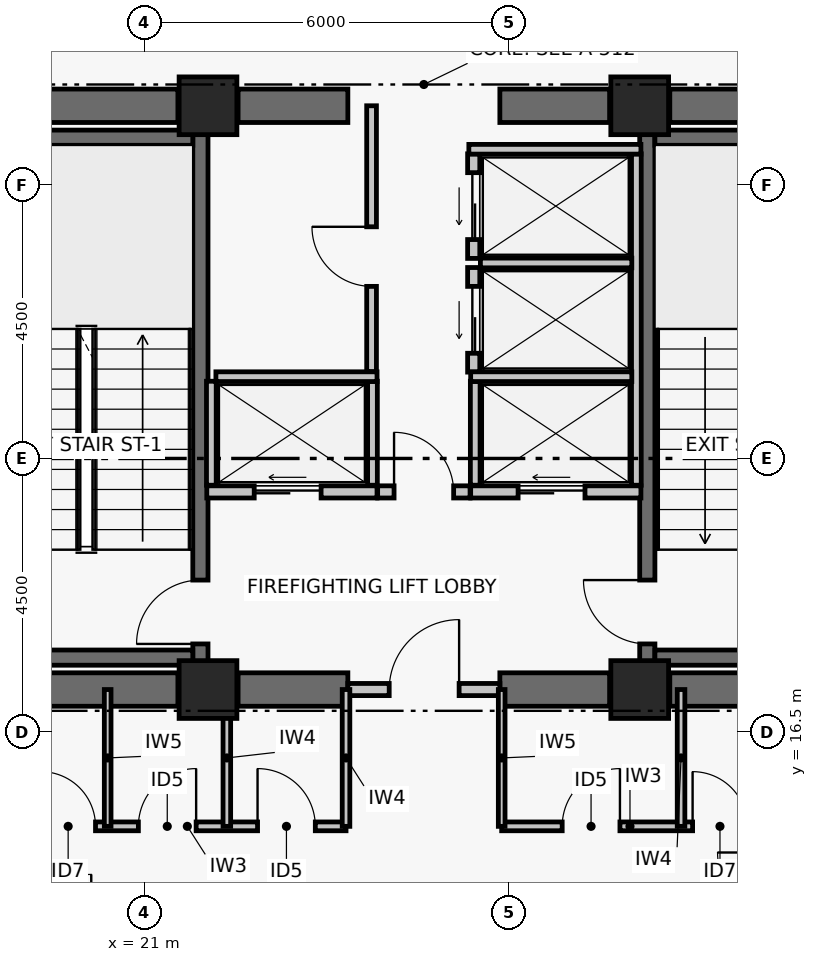
"""IFC4 building model, lengths in metres.
Left out: names, types, materials, properties, quantities, classifications, styles, units other than length and angle.
Written with IfcOpenShell. Run it as: python <this file> out.ifc"""

import sys

from ifc_helpers import new_model, si_unit, direction, frame, frame_2d, origin, origin_2d, place, context, subcontext, project, spatial, rectangle, extrude, element, fill, save


model = new_model("IFC4")
c1 = context("Model", 3, precision=1e-05, world=origin(), true_north=direction((0.0, 1.0)))
c2 = subcontext(c1, "Body", "Model", "MODEL_VIEW")
j1 = project(units=[si_unit("LENGTHUNIT", "METRE"), si_unit("PLANEANGLEUNIT", "RADIAN")], contexts=[c1])
p1 = place(None, origin())
s1 = spatial("IfcSite", under=j1, at=p1, CompositionType="ELEMENT")
p2 = place(p1, origin())
s2 = spatial("IfcBuilding", under=s1, at=p2, CompositionType="ELEMENT")
p3 = place(p2, frame((0.0, 0.0, 154.32)))
s3 = spatial("IfcBuildingStorey", under=s2, at=p3, CompositionType="ELEMENT", Elevation=154.32)
for number, where, z_axis, x_axis in (
    (1, (22.05, 17.2, 0.0), (0.0, 0.0, 1.0), (1.0, 0.0, 0.0)),
    (2, (29.15, 17.2, 0.0), (0.0, 0.0, 1.0), (1.0, 0.0, 0.0)),
    (3, (22.05, 26.8, 0.0), (0.0, 0.0, 1.0), (1.0, 0.0, 0.0)),
    (4, (29.15, 26.8, 0.0), (0.0, 0.0, 1.0), (1.0, 0.0, 0.0)),
):
    element("IfcColumn", number, at=place(p3, frame(where, z_axis=z_axis, x_axis=x_axis)), inside=s3, PredefinedType="COLUMN", context=c2, shape_type="SweptSolid", body=[
        extrude(rectangle(XDim=0.95, YDim=0.95, at=origin_2d()), origin(), (0.0, 0.0, 1.0), 3.72),
    ])
p4 = place(p3, frame((18.295, 17.2, 0.0), z_axis=(0.0, 0.0, 1.0), x_axis=(1.0, 0.0, 0.0)))
e5 = element("IfcWall", 5, at=p4, inside=s3, PredefinedType="SHEAR", context=c2, shape_type="SweptSolid", body=[
    extrude(rectangle(XDim=3.26, YDim=0.55, at=frame_2d((1.63, 0.0))), origin(), (0.0, 0.0, 1.0), 3.5),
])
p5 = place(p3, frame((22.545, 17.2, 0.0), z_axis=(0.0, 0.0, 1.0), x_axis=(1.0, 0.0, 0.0)))
e6 = element("IfcWall", 6, at=p5, inside=s3, PredefinedType="SHEAR", context=c2, shape_type="SweptSolid", body=[
    extrude(rectangle(XDim=1.805, YDim=0.55, at=frame_2d((0.903, 0.0))), origin(), (0.0, 0.0, 1.0), 3.5),
])
p6 = place(p3, frame((26.85, 17.2, 0.0), z_axis=(0.0, 0.0, 1.0), x_axis=(1.0, 0.0, 0.0)))
e7 = element("IfcWall", 7, at=p6, inside=s3, PredefinedType="SHEAR", context=c2, shape_type="SweptSolid", body=[
    extrude(rectangle(XDim=1.805, YDim=0.55, at=frame_2d((0.902, 0.0))), origin(), (0.0, 0.0, 1.0), 3.5),
])
for number, where, z_axis, x_axis in (
    (8, (29.645, 17.2, 0.0), (0.0, 0.0, 1.0), (1.0, 0.0, 0.0)),
    (9, (18.295, 26.8, 0.0), (0.0, 0.0, 1.0), (1.0, 0.0, 0.0)),
):
    element("IfcWall", number, at=place(p3, frame(where, z_axis=z_axis, x_axis=x_axis)), inside=s3, PredefinedType="SHEAR", context=c2, shape_type="SweptSolid", body=[
        extrude(rectangle(XDim=3.26, YDim=0.55, at=frame_2d((1.63, 0.0))), origin(), (0.0, 0.0, 1.0), 3.5),
    ])
p7 = place(p3, frame((22.545, 26.8, 0.0), z_axis=(0.0, 0.0, 1.0), x_axis=(1.0, 0.0, 0.0)))
e10 = element("IfcWall", 10, at=p7, inside=s3, PredefinedType="SHEAR", context=c2, shape_type="SweptSolid", body=[
    extrude(rectangle(XDim=1.805, YDim=0.55, at=frame_2d((0.903, 0.0))), origin(), (0.0, 0.0, 1.0), 3.5),
])
p8 = place(p3, frame((26.85, 26.8, 0.0), z_axis=(0.0, 0.0, 1.0), x_axis=(1.0, 0.0, 0.0)))
e11 = element("IfcWall", 11, at=p8, inside=s3, PredefinedType="SHEAR", context=c2, shape_type="SweptSolid", body=[
    extrude(rectangle(XDim=1.805, YDim=0.55, at=frame_2d((0.902, 0.0))), origin(), (0.0, 0.0, 1.0), 3.5),
])
p9 = place(p3, frame((29.645, 26.8, 0.0), z_axis=(0.0, 0.0, 1.0), x_axis=(1.0, 0.0, 0.0)))
e12 = element("IfcWall", 12, at=p9, inside=s3, PredefinedType="SHEAR", context=c2, shape_type="SweptSolid", body=[
    extrude(rectangle(XDim=3.26, YDim=0.55, at=frame_2d((1.63, 0.0))), origin(), (0.0, 0.0, 1.0), 3.5),
])
p10 = place(p3, frame((21.925, 17.6, 0.0), z_axis=(0.0, 0.0, 1.0), x_axis=(0.0, 1.0, 0.0)))
e13 = element("IfcWall", 13, at=p10, inside=s3, PredefinedType="SHEAR", context=c2, shape_type="SweptSolid", body=[
    extrude(rectangle(XDim=8.8, YDim=0.25, at=frame_2d((4.4, 0.0))), origin(), (0.0, 0.0, 1.0), 3.5),
])
p11 = place(p10, frame((0.35, 0.0, 0.0)))
e14 = element("IfcOpeningElement", 14, at=p11, cuts=e13, PredefinedType="OPENING", context=c2, shape_type="SweptSolid", body=[
    extrude(rectangle(XDim=1.05, YDim=2.08, at=frame_2d((0.525, 1.04))), frame((0.0, 0.135, 0.0), z_axis=(0.0, -1.0, 0.0), x_axis=(1.0, 0.0, 0.0)), (0.0, 0.0, 1.0), 0.27),
])
for number, where, z_axis, x_axis in (
    (15, (18.329, 17.725, 0.0), (0.0, 0.0, 1.0), (1.0, 0.0, 0.0)),
    (16, (18.329, 26.275, 0.0), (0.0, 0.0, 1.0), (1.0, 0.0, 0.0)),
):
    element("IfcWall", number, at=place(p3, frame(where, z_axis=z_axis, x_axis=x_axis)), inside=s3, PredefinedType="SHEAR", context=c2, shape_type="SweptSolid", body=[
        extrude(rectangle(XDim=3.471, YDim=0.25, at=frame_2d((1.735, 0.0))), origin(), (0.0, 0.0, 1.0), 3.5),
    ])
p12 = place(p3, frame((29.275, 17.6, 0.0), z_axis=(0.0, 0.0, 1.0), x_axis=(0.0, 1.0, 0.0)))
e17 = element("IfcWall", 17, at=p12, inside=s3, PredefinedType="SHEAR", context=c2, shape_type="SweptSolid", body=[
    extrude(rectangle(XDim=8.8, YDim=0.25, at=frame_2d((4.4, 0.0))), origin(), (0.0, 0.0, 1.0), 3.5),
])
p13 = place(p12, frame((0.35, 0.0, 0.0)))
e18 = element("IfcOpeningElement", 18, at=p13, cuts=e17, PredefinedType="OPENING", context=c2, shape_type="SweptSolid", body=[
    extrude(rectangle(XDim=1.05, YDim=2.08, at=frame_2d((0.525, 1.04))), frame((0.0, 0.135, 0.0), z_axis=(0.0, -1.0, 0.0), x_axis=(1.0, 0.0, 0.0)), (0.0, 0.0, 1.0), 0.27),
])
for number, where, z_axis, x_axis in (
    (19, (29.4, 17.725, 0.0), (0.0, 0.0, 1.0), (1.0, 0.0, 0.0)),
    (20, (29.4, 26.275, 0.0), (0.0, 0.0, 1.0), (1.0, 0.0, 0.0)),
):
    element("IfcWall", number, at=place(p3, frame(where, z_axis=z_axis, x_axis=x_axis)), inside=s3, PredefinedType="SHEAR", context=c2, shape_type="SweptSolid", body=[
        extrude(rectangle(XDim=3.471, YDim=0.25, at=frame_2d((1.736, 0.0))), origin(), (0.0, 0.0, 1.0), 3.5),
    ])
p14 = place(p3, frame((24.35, 17.2, 0.0), z_axis=(0.0, 0.0, 1.0), x_axis=(1.0, 0.0, 0.0)))
e21 = element("IfcWall", 21, at=p14, inside=s3, PredefinedType="PARTITIONING", context=c2, shape_type="SweptSolid", body=[
    extrude(rectangle(XDim=2.5, YDim=0.2, at=frame_2d((1.25, 0.0))), origin(), (0.0, 0.0, 1.0), 2.63),
])
p15 = place(p14, frame((0.68, 0.0, 0.0)))
e22 = element("IfcOpeningElement", 22, at=p15, cuts=e21, PredefinedType="OPENING", context=c2, shape_type="SweptSolid", body=[
    extrude(rectangle(XDim=1.15, YDim=2.08, at=frame_2d((0.575, 1.04))), frame((0.0, 0.11, 0.0), z_axis=(0.0, -1.0, 0.0), x_axis=(1.0, 0.0, 0.0)), (0.0, 0.0, 1.0), 0.22),
])
p16 = place(p3, frame((24.84, 20.45, 0.0), z_axis=(0.0, 0.0, 1.0), x_axis=(1.0, 0.0, 0.0)))
e23 = element("IfcWall", 23, at=p16, inside=s3, PredefinedType="PARTITIONING", context=c2, shape_type="SweptSolid", body=[
    extrude(rectangle(XDim=1.52, YDim=0.2, at=frame_2d((0.76, 0.0))), origin(), (0.0, 0.0, 1.0), 3.5),
])
p17 = place(p16, frame((0.27, 0.0, 0.0)))
e24 = element("IfcOpeningElement", 24, at=p17, cuts=e23, PredefinedType="OPENING", context=c2, shape_type="SweptSolid", body=[
    extrude(rectangle(XDim=0.98, YDim=2.06, at=frame_2d((0.49, 1.03))), frame((0.0, 0.11, 0.0), z_axis=(0.0, -1.0, 0.0), x_axis=(1.0, 0.0, 0.0)), (0.0, 0.0, 1.0), 0.22),
])
p18 = place(p3, frame((22.03, 20.45, 0.0), z_axis=(0.0, 0.0, 1.0), x_axis=(1.0, 0.0, 0.0)))
e25 = element("IfcWall", 25, at=p18, inside=s3, PredefinedType="PARTITIONING", context=c2, shape_type="SweptSolid", body=[
    extrude(rectangle(XDim=2.8, YDim=0.2, at=frame_2d((1.4, 0.0))), origin(), (0.0, 0.0, 1.0), 3.5),
])
p19 = place(p18, frame((0.78, 0.0, 0.0)))
e26 = element("IfcOpeningElement", 26, at=p19, cuts=e25, PredefinedType="OPENING", context=c2, shape_type="SweptSolid", body=[
    extrude(rectangle(XDim=1.1, YDim=2.08, at=frame_2d((0.55, 1.04))), frame((0.0, 0.11, 0.0), z_axis=(0.0, -1.0, 0.0), x_axis=(1.0, 0.0, 0.0)), (0.0, 0.0, 1.0), 0.22),
])
p20 = place(p3, frame((26.37, 20.45, 0.0), z_axis=(0.0, 0.0, 1.0), x_axis=(1.0, 0.0, 0.0)))
e27 = element("IfcWall", 27, at=p20, inside=s3, PredefinedType="PARTITIONING", context=c2, shape_type="SweptSolid", body=[
    extrude(rectangle(XDim=2.8, YDim=0.2, at=frame_2d((1.4, 0.0))), origin(), (0.0, 0.0, 1.0), 3.5),
])
p21 = place(p20, frame((0.78, 0.0, 0.0)))
e28 = element("IfcOpeningElement", 28, at=p21, cuts=e27, PredefinedType="OPENING", context=c2, shape_type="SweptSolid", body=[
    extrude(rectangle(XDim=1.1, YDim=2.08, at=frame_2d((0.55, 1.04))), frame((0.0, 0.11, 0.0), z_axis=(0.0, -1.0, 0.0), x_axis=(1.0, 0.0, 0.0)), (0.0, 0.0, 1.0), 0.22),
])
p22 = place(p3, frame((26.42, 22.42, 0.0), z_axis=(0.0, 0.0, 1.0), x_axis=(0.0, 1.0, 0.0)))
e29 = element("IfcWall", 29, at=p22, inside=s3, PredefinedType="PARTITIONING", context=c2, shape_type="SweptSolid", body=[
    extrude(rectangle(XDim=1.72, YDim=0.2, at=frame_2d((0.86, 0.0))), origin(), (0.0, 0.0, 1.0), 3.5),
])
p23 = place(p22, frame((0.31, 0.0, 0.0)))
e30 = element("IfcOpeningElement", 30, at=p23, cuts=e29, PredefinedType="OPENING", context=c2, shape_type="SweptSolid", body=[
    extrude(rectangle(XDim=1.1, YDim=2.08, at=frame_2d((0.55, 1.04))), frame((0.0, 0.11, 0.0), z_axis=(0.0, -1.0, 0.0), x_axis=(1.0, 0.0, 0.0)), (0.0, 0.0, 1.0), 0.22),
])
p24 = place(p3, frame((26.42, 24.29, 0.0), z_axis=(0.0, 0.0, 1.0), x_axis=(0.0, 1.0, 0.0)))
e31 = element("IfcWall", 31, at=p24, inside=s3, PredefinedType="PARTITIONING", context=c2, shape_type="SweptSolid", body=[
    extrude(rectangle(XDim=1.72, YDim=0.2, at=frame_2d((0.86, 0.0))), origin(), (0.0, 0.0, 1.0), 3.5),
])
p25 = place(p24, frame((0.31, 0.0, 0.0)))
e32 = element("IfcOpeningElement", 32, at=p25, cuts=e31, PredefinedType="OPENING", context=c2, shape_type="SweptSolid", body=[
    extrude(rectangle(XDim=1.1, YDim=2.08, at=frame_2d((0.55, 1.04))), frame((0.0, 0.11, 0.0), z_axis=(0.0, -1.0, 0.0), x_axis=(1.0, 0.0, 0.0)), (0.0, 0.0, 1.0), 0.22),
])
for number, where, z_axis, x_axis in (
    (33, (22.105, 20.56, 0.0), (0.0, 0.0, 1.0), (0.0, 1.0, 0.0)),
    (34, (24.755, 20.56, 0.0), (0.0, 0.0, 1.0), (0.0, 1.0, 0.0)),
):
    element("IfcWall", number, at=place(p3, frame(where, z_axis=z_axis, x_axis=x_axis)), inside=s3, PredefinedType="PARTITIONING", context=c2, shape_type="SweptSolid", body=[
        extrude(rectangle(XDim=1.71, YDim=0.16, at=frame_2d((0.855, 0.0))), origin(), (0.0, 0.0, 1.0), 3.5),
    ])
p26 = place(p3, frame((22.18, 22.345, 0.0), z_axis=(0.0, 0.0, 1.0), x_axis=(1.0, 0.0, 0.0)))
e35 = element("IfcWall", 35, at=p26, inside=s3, PredefinedType="PARTITIONING", context=c2, shape_type="SweptSolid", body=[
    extrude(rectangle(XDim=2.65, YDim=0.16, at=frame_2d((1.325, 0.0))), origin(), (0.0, 0.0, 1.0), 3.5),
])
p27 = place(p3, frame((29.095, 20.56, 0.0), z_axis=(0.0, 0.0, 1.0), x_axis=(0.0, 1.0, 0.0)))
e36 = element("IfcWall", 36, at=p27, inside=s3, PredefinedType="PARTITIONING", context=c2, shape_type="SweptSolid", body=[
    extrude(rectangle(XDim=5.45, YDim=0.16, at=frame_2d((2.725, 0.0))), origin(), (0.0, 0.0, 1.0), 3.5),
])
p28 = place(p3, frame((26.445, 20.56, 0.0), z_axis=(0.0, 0.0, 1.0), x_axis=(0.0, 1.0, 0.0)))
e37 = element("IfcWall", 37, at=p28, inside=s3, PredefinedType="PARTITIONING", context=c2, shape_type="SweptSolid", body=[
    extrude(rectangle(XDim=1.71, YDim=0.16, at=frame_2d((0.855, 0.0))), origin(), (0.0, 0.0, 1.0), 3.5),
])
p29 = place(p3, frame((26.37, 22.345, 0.0), z_axis=(0.0, 0.0, 1.0), x_axis=(1.0, 0.0, 0.0)))
e38 = element("IfcWall", 38, at=p29, inside=s3, PredefinedType="PARTITIONING", context=c2, shape_type="SweptSolid", body=[
    extrude(rectangle(XDim=2.65, YDim=0.16, at=frame_2d((1.325, 0.0))), origin(), (0.0, 0.0, 1.0), 3.5),
])
p30 = place(p3, frame((26.53, 24.215, 0.0), z_axis=(0.0, 0.0, 1.0), x_axis=(1.0, 0.0, 0.0)))
e39 = element("IfcWall", 39, at=p30, inside=s3, PredefinedType="PARTITIONING", context=c2, shape_type="SweptSolid", body=[
    extrude(rectangle(XDim=2.49, YDim=0.16, at=frame_2d((1.245, 0.0))), origin(), (0.0, 0.0, 1.0), 3.5),
])
p31 = place(p3, frame((26.34, 26.085, 0.0), z_axis=(0.0, 0.0, 1.0), x_axis=(1.0, 0.0, 0.0)))
e40 = element("IfcWall", 40, at=p31, inside=s3, PredefinedType="PARTITIONING", context=c2, shape_type="SweptSolid", body=[
    extrude(rectangle(XDim=2.83, YDim=0.16, at=frame_2d((1.415, 0.0))), origin(), (0.0, 0.0, 1.0), 3.5),
])
p32 = place(p3, frame((24.74, 22.43, 0.0), z_axis=(0.0, 0.0, 1.0), x_axis=(0.0, 1.0, 0.0)))
e41 = element("IfcWall", 41, at=p32, inside=s3, PredefinedType="PARTITIONING", context=c2, shape_type="SweptSolid", body=[
    extrude(rectangle(XDim=4.37, YDim=0.16, at=frame_2d((2.185, 0.0))), origin(), (0.0, 0.0, 1.0), 2.63),
])
p33 = place(p32, frame((1.4, 0.0, 0.0)))
e42 = element("IfcOpeningElement", 42, at=p33, cuts=e41, PredefinedType="OPENING", context=c2, shape_type="SweptSolid", body=[
    extrude(rectangle(XDim=0.98, YDim=2.06, at=frame_2d((0.49, 1.03))), frame((0.0, 0.09, 0.0), z_axis=(0.0, -1.0, 0.0), x_axis=(1.0, 0.0, 0.0)), (0.0, 0.0, 1.0), 0.18),
])
p34 = place(p3, frame((19.1, 14.95, 0.0), z_axis=(0.0, 0.0, 1.0), x_axis=(1.0, 0.0, 0.0)))
e43 = element("IfcWall", 43, at=p34, inside=s3, PredefinedType="PARTITIONING", context=c2, shape_type="SweptSolid", body=[
    extrude(rectangle(XDim=5.22, YDim=0.145, at=frame_2d((2.61, 0.0))), origin(), (0.0, 0.0, 1.0), 2.73),
])
p35 = place(p34, frame((0.2, 0.0, 0.0)))
e44 = element("IfcOpeningElement", 44, at=p35, cuts=e43, PredefinedType="OPENING", context=c2, shape_type="SweptSolid", body=[
    extrude(rectangle(XDim=0.9, YDim=2.02, at=frame_2d((0.45, 1.01))), frame((0.0, 0.083, 0.0), z_axis=(0.0, -1.0, 0.0), x_axis=(1.0, 0.0, 0.0)), (0.0, 0.0, 1.0), 0.165),
])
p36 = place(p34, frame((1.805, 0.0, 0.0)))
e45 = element("IfcOpeningElement", 45, at=p36, cuts=e43, PredefinedType="OPENING", context=c2, shape_type="SweptSolid", body=[
    extrude(rectangle(XDim=0.95, YDim=2.06, at=frame_2d((0.475, 1.03))), frame((0.0, 0.083, 0.0), z_axis=(0.0, -1.0, 0.0), x_axis=(1.0, 0.0, 0.0)), (0.0, 0.0, 1.0), 0.165),
])
p37 = place(p34, frame((3.765, 0.0, 0.0)))
e46 = element("IfcOpeningElement", 46, at=p37, cuts=e43, PredefinedType="OPENING", context=c2, shape_type="SweptSolid", body=[
    extrude(rectangle(XDim=0.95, YDim=2.06, at=frame_2d((0.475, 1.03))), frame((0.0, 0.083, 0.0), z_axis=(0.0, -1.0, 0.0), x_axis=(1.0, 0.0, 0.0)), (0.0, 0.0, 1.0), 0.165),
])
p38 = place(p3, frame((26.88, 14.95, 0.0), z_axis=(0.0, 0.0, 1.0), x_axis=(1.0, 0.0, 0.0)))
e47 = element("IfcWall", 47, at=p38, inside=s3, PredefinedType="PARTITIONING", context=c2, shape_type="SweptSolid", body=[
    extrude(rectangle(XDim=4.22, YDim=0.145, at=frame_2d((2.11, 0.0))), origin(), (0.0, 0.0, 1.0), 2.93),
])
p39 = place(p38, frame((0.995, 0.0, 0.0)))
e48 = element("IfcOpeningElement", 48, at=p39, cuts=e47, PredefinedType="OPENING", context=c2, shape_type="SweptSolid", body=[
    extrude(rectangle(XDim=0.95, YDim=2.06, at=frame_2d((0.475, 1.03))), frame((0.0, 0.083, 0.0), z_axis=(0.0, -1.0, 0.0), x_axis=(1.0, 0.0, 0.0)), (0.0, 0.0, 1.0), 0.165),
])
p40 = place(p38, frame((3.14, 0.0, 0.0)))
e49 = element("IfcOpeningElement", 49, at=p40, cuts=e47, PredefinedType="OPENING", context=c2, shape_type="SweptSolid", body=[
    extrude(rectangle(XDim=0.9, YDim=2.02, at=frame_2d((0.45, 1.01))), frame((0.0, 0.083, 0.0), z_axis=(0.0, -1.0, 0.0), x_axis=(1.0, 0.0, 0.0)), (0.0, 0.0, 1.0), 0.165),
])
p41 = place(p3, frame((20.4, 14.95, 0.0), z_axis=(0.0, 0.0, 1.0), x_axis=(0.0, 1.0, 0.0)))
e50 = element("IfcWall", 50, at=p41, inside=s3, PredefinedType="PARTITIONING", context=c2, shape_type="SweptSolid", body=[
    extrude(rectangle(XDim=2.25, YDim=0.11, at=frame_2d((1.125, 0.0))), origin(), (0.0, 0.0, 1.0), 2.63),
])
for number, where, z_axis, x_axis in (
    (51, (22.36, 14.95, 0.0), (0.0, 0.0, 1.0), (0.0, 1.0, 0.0)),
    (52, (24.32, 14.95, 0.0), (0.0, 0.0, 1.0), (0.0, 1.0, 0.0)),
):
    element("IfcWall", number, at=place(p3, frame(where, z_axis=z_axis, x_axis=x_axis)), inside=s3, PredefinedType="PARTITIONING", context=c2, shape_type="SweptSolid", body=[
        extrude(rectangle(XDim=2.25, YDim=0.125, at=frame_2d((1.125, 0.0))), origin(), (0.0, 0.0, 1.0), 2.63),
    ])
p42 = place(p3, frame((26.88, 14.95, 0.0), z_axis=(0.0, 0.0, 1.0), x_axis=(0.0, 1.0, 0.0)))
e53 = element("IfcWall", 53, at=p42, inside=s3, PredefinedType="PARTITIONING", context=c2, shape_type="SweptSolid", body=[
    extrude(rectangle(XDim=2.25, YDim=0.11, at=frame_2d((1.125, 0.0))), origin(), (0.0, 0.0, 1.0), 2.63),
])
p43 = place(p3, frame((29.83, 14.95, 0.0), z_axis=(0.0, 0.0, 1.0), x_axis=(0.0, 1.0, 0.0)))
e54 = element("IfcWall", 54, at=p43, inside=s3, PredefinedType="PARTITIONING", context=c2, shape_type="SweptSolid", body=[
    extrude(rectangle(XDim=2.25, YDim=0.125, at=frame_2d((1.125, 0.0))), origin(), (0.0, 0.0, 1.0), 2.63),
])
p44 = place(p11, origin())
e55 = element("IfcDoor", 55, at=p44, inside=s3, OperationType="SINGLE_SWING_LEFT", PredefinedType="DOOR", context=c2, shape_type="SweptSolid", body=[
    extrude(rectangle(XDim=1.05, YDim=2.08, at=frame_2d((0.525, 1.04))), frame((0.0, 0.025, 0.0), z_axis=(0.0, -1.0, 0.0), x_axis=(1.0, 0.0, 0.0)), (0.0, 0.0, 1.0), 0.05),
])
fill(e14, e55)
p45 = place(p13, origin())
e56 = element("IfcDoor", 56, at=p45, inside=s3, OperationType="SINGLE_SWING_RIGHT", PredefinedType="DOOR", context=c2, shape_type="SweptSolid", body=[
    extrude(rectangle(XDim=1.05, YDim=2.08, at=frame_2d((0.525, 1.04))), frame((0.0, 0.025, 0.0), z_axis=(0.0, -1.0, 0.0), x_axis=(1.0, 0.0, 0.0)), (0.0, 0.0, 1.0), 0.05),
])
fill(e18, e56)
p46 = place(p15, origin())
e57 = element("IfcDoor", 57, at=p46, inside=s3, OperationType="SINGLE_SWING_RIGHT", PredefinedType="DOOR", context=c2, shape_type="SweptSolid", body=[
    extrude(rectangle(XDim=1.15, YDim=2.08, at=frame_2d((0.575, 1.04))), frame((0.0, 0.025, 0.0), z_axis=(0.0, -1.0, 0.0), x_axis=(1.0, 0.0, 0.0)), (0.0, 0.0, 1.0), 0.05),
])
fill(e22, e57)
p47 = place(p17, origin())
e58 = element("IfcDoor", 58, at=p47, inside=s3, OperationType="SINGLE_SWING_LEFT", PredefinedType="DOOR", context=c2, shape_type="SweptSolid", body=[
    extrude(rectangle(XDim=0.98, YDim=2.06, at=frame_2d((0.49, 1.03))), frame((0.0, 0.025, 0.0), z_axis=(0.0, -1.0, 0.0), x_axis=(1.0, 0.0, 0.0)), (0.0, 0.0, 1.0), 0.05),
])
fill(e24, e58)
p48 = place(p19, origin())
e59 = element("IfcDoor", 59, at=p48, inside=s3, OperationType="DOUBLE_DOOR_SLIDING", PredefinedType="DOOR", context=c2, shape_type="SweptSolid", body=[
    extrude(rectangle(XDim=1.1, YDim=2.08, at=frame_2d((0.55, 1.04))), frame((0.0, 0.025, 0.0), z_axis=(0.0, -1.0, 0.0), x_axis=(1.0, 0.0, 0.0)), (0.0, 0.0, 1.0), 0.05),
])
fill(e26, e59)
p49 = place(p21, origin())
e60 = element("IfcDoor", 60, at=p49, inside=s3, OperationType="DOUBLE_DOOR_SLIDING", PredefinedType="DOOR", context=c2, shape_type="SweptSolid", body=[
    extrude(rectangle(XDim=1.1, YDim=2.08, at=frame_2d((0.55, 1.04))), frame((0.0, 0.025, 0.0), z_axis=(0.0, -1.0, 0.0), x_axis=(1.0, 0.0, 0.0)), (0.0, 0.0, 1.0), 0.05),
])
fill(e28, e60)
p50 = place(p23, origin())
e61 = element("IfcDoor", 61, at=p50, inside=s3, OperationType="DOUBLE_DOOR_SLIDING", PredefinedType="DOOR", context=c2, shape_type="SweptSolid", body=[
    extrude(rectangle(XDim=1.1, YDim=2.08, at=frame_2d((0.55, 1.04))), frame((0.0, 0.025, 0.0), z_axis=(0.0, -1.0, 0.0), x_axis=(1.0, 0.0, 0.0)), (0.0, 0.0, 1.0), 0.05),
])
fill(e30, e61)
p51 = place(p25, origin())
e62 = element("IfcDoor", 62, at=p51, inside=s3, OperationType="DOUBLE_DOOR_SLIDING", PredefinedType="DOOR", context=c2, shape_type="SweptSolid", body=[
    extrude(rectangle(XDim=1.1, YDim=2.08, at=frame_2d((0.55, 1.04))), frame((0.0, 0.025, 0.0), z_axis=(0.0, -1.0, 0.0), x_axis=(1.0, 0.0, 0.0)), (0.0, 0.0, 1.0), 0.05),
])
fill(e32, e62)
p52 = place(p33, origin())
e63 = element("IfcDoor", 63, at=p52, inside=s3, OperationType="SINGLE_SWING_RIGHT", PredefinedType="DOOR", context=c2, shape_type="SweptSolid", body=[
    extrude(rectangle(XDim=0.98, YDim=2.06, at=frame_2d((0.49, 1.03))), frame((0.0, 0.025, 0.0), z_axis=(0.0, -1.0, 0.0), x_axis=(1.0, 0.0, 0.0)), (0.0, 0.0, 1.0), 0.05),
])
fill(e42, e63)
p53 = place(p35, origin())
e64 = element("IfcDoor", 64, at=p53, inside=s3, OperationType="SINGLE_SWING_LEFT", PredefinedType="DOOR", context=c2, shape_type="SweptSolid", body=[
    extrude(rectangle(XDim=0.9, YDim=2.02, at=frame_2d((0.45, 1.01))), frame((0.0, 0.025, 0.0), z_axis=(0.0, -1.0, 0.0), x_axis=(1.0, 0.0, 0.0)), (0.0, 0.0, 1.0), 0.05),
])
fill(e44, e64)
p54 = place(p36, origin())
e65 = element("IfcDoor", 65, at=p54, inside=s3, OperationType="SINGLE_SWING_RIGHT", PredefinedType="DOOR", context=c2, shape_type="SweptSolid", body=[
    extrude(rectangle(XDim=0.95, YDim=2.06, at=frame_2d((0.475, 1.03))), frame((0.0, 0.025, 0.0), z_axis=(0.0, -1.0, 0.0), x_axis=(1.0, 0.0, 0.0)), (0.0, 0.0, 1.0), 0.05),
])
fill(e45, e65)
p55 = place(p37, origin())
e66 = element("IfcDoor", 66, at=p55, inside=s3, OperationType="SINGLE_SWING_LEFT", PredefinedType="DOOR", context=c2, shape_type="SweptSolid", body=[
    extrude(rectangle(XDim=0.95, YDim=2.06, at=frame_2d((0.475, 1.03))), frame((0.0, 0.025, 0.0), z_axis=(0.0, -1.0, 0.0), x_axis=(1.0, 0.0, 0.0)), (0.0, 0.0, 1.0), 0.05),
])
fill(e46, e66)
p56 = place(p39, origin())
e67 = element("IfcDoor", 67, at=p56, inside=s3, OperationType="SINGLE_SWING_RIGHT", PredefinedType="DOOR", context=c2, shape_type="SweptSolid", body=[
    extrude(rectangle(XDim=0.95, YDim=2.06, at=frame_2d((0.475, 1.03))), frame((0.0, 0.025, 0.0), z_axis=(0.0, -1.0, 0.0), x_axis=(1.0, 0.0, 0.0)), (0.0, 0.0, 1.0), 0.05),
])
fill(e48, e67)
p57 = place(p40, origin())
e68 = element("IfcDoor", 68, at=p57, inside=s3, OperationType="SINGLE_SWING_LEFT", PredefinedType="DOOR", context=c2, shape_type="SweptSolid", body=[
    extrude(rectangle(XDim=0.9, YDim=2.02, at=frame_2d((0.45, 1.01))), frame((0.0, 0.025, 0.0), z_axis=(0.0, -1.0, 0.0), x_axis=(1.0, 0.0, 0.0)), (0.0, 0.0, 1.0), 0.05),
])
fill(e49, e68)
save(model, sys.argv[1])
